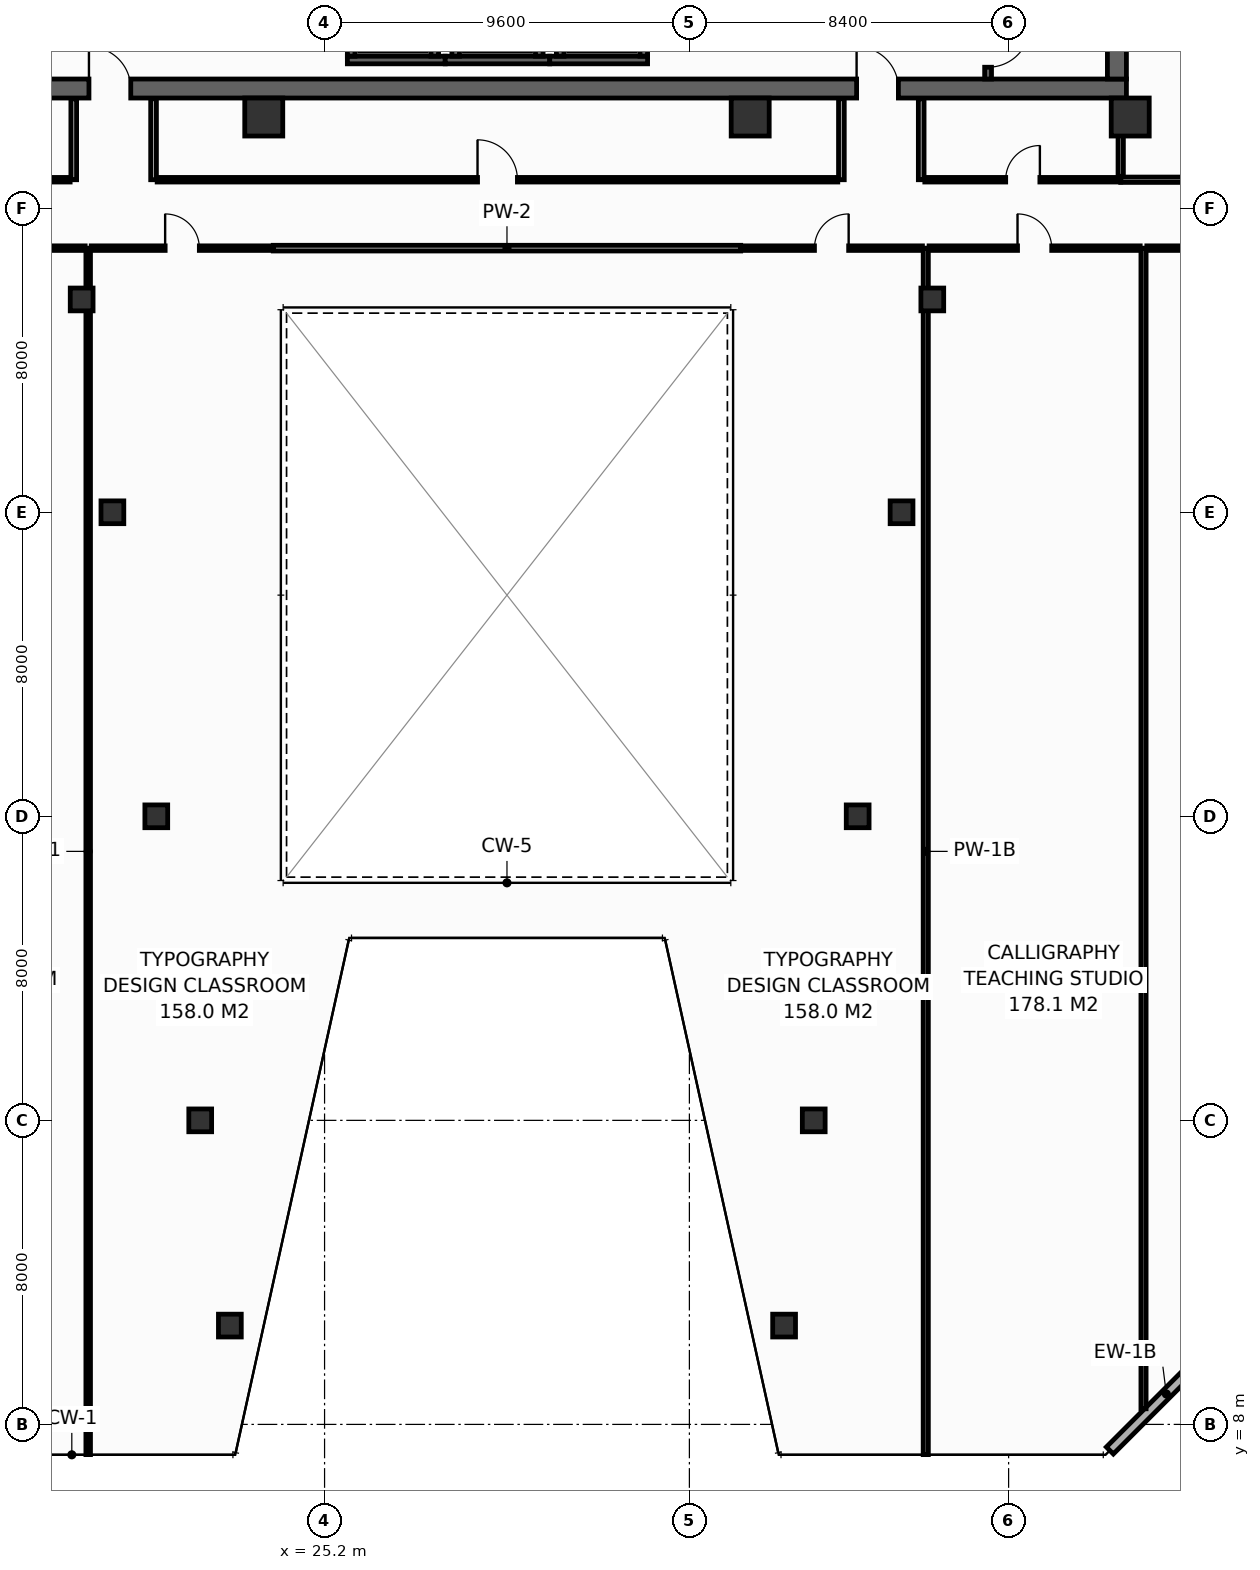
"""IFC4 building model, lengths in metres.
Left out: names, types, materials, properties, quantities, classifications, styles, units other than length and angle.
Written with IfcOpenShell. Run it as: python <this file> out.ifc"""

import sys

from ifc_helpers import new_model, si_unit, direction, frame, frame_2d, origin, origin_2d, place, context, subcontext, project, spatial, rectangle, hollow_rectangle, extrude, element, fill, save


model = new_model("IFC4")
c1 = context("Model", 3, precision=1e-05, world=origin(), true_north=direction((0.0, 1.0)))
c2 = subcontext(c1, "Body", "Model", "MODEL_VIEW")
j1 = project(units=[si_unit("LENGTHUNIT", "METRE"), si_unit("PLANEANGLEUNIT", "RADIAN")], contexts=[c1])
p1 = place(None, origin())
s1 = spatial("IfcSite", under=j1, at=p1, CompositionType="ELEMENT")
p2 = place(p1, origin())
s2 = spatial("IfcBuilding", under=s1, at=p2, CompositionType="ELEMENT")
p3 = place(p2, frame((0.0, 0.0, 137.2)))
s3 = spatial("IfcBuildingStorey", under=s2, at=p3, CompositionType="ELEMENT", Elevation=137.2)
p4 = place(p3, frame((13.6, 43.15, 0.0), z_axis=(0.0, 0.0, 1.0), x_axis=(1.0, 0.0, 0.0)))
e1 = element("IfcWall", 1, at=p4, inside=s3, PredefinedType="SHEAR", context=c2, shape_type="SweptSolid", body=[
    extrude(rectangle(XDim=32.7, YDim=0.5, at=frame_2d((16.35, 0.0))), origin(), (0.0, 0.0, 1.0), 3.55),
])
p5 = place(p4, frame((5.4, 0.0, 0.0)))
e2 = element("IfcOpeningElement", 2, at=p5, cuts=e1, PredefinedType="OPENING", context=c2, shape_type="SweptSolid", body=[
    extrude(rectangle(XDim=1.1, YDim=2.15, at=frame_2d((0.55, 1.075))), frame((0.0, 0.26, 0.0), z_axis=(0.0, -1.0, 0.0), x_axis=(1.0, 0.0, 0.0)), (0.0, 0.0, 1.0), 0.52),
])
p6 = place(p4, frame((25.6, 0.0, 0.0)))
e3 = element("IfcOpeningElement", 3, at=p6, cuts=e1, PredefinedType="OPENING", context=c2, shape_type="SweptSolid", body=[
    extrude(rectangle(XDim=1.1, YDim=2.15, at=frame_2d((0.55, 1.075))), frame((0.0, 0.26, 0.0), z_axis=(0.0, -1.0, 0.0), x_axis=(1.0, 0.0, 0.0)), (0.0, 0.0, 1.0), 0.52),
])
p7 = place(p3, frame((46.05, 43.4, 0.0), z_axis=(0.0, 0.0, 1.0), x_axis=(0.0, 1.0, 0.0)))
e4 = element("IfcWall", 4, at=p7, inside=s3, PredefinedType="SHEAR", context=c2, shape_type="SweptSolid", body=[
    extrude(rectangle(XDim=10.4, YDim=0.5, at=frame_2d((5.2, 0.0))), origin(), (0.0, 0.0, 1.0), 3.55),
])
for number, where, z_axis, x_axis in (
    (5, (23.6, 42.4, 0.0), (0.0, 0.0, 1.0), (1.0, 0.0, 0.0)),
    (6, (36.4, 42.4, 0.0), (0.0, 0.0, 1.0), (1.0, 0.0, 0.0)),
    (7, (46.4, 42.4, 0.0), (0.0, 0.0, 1.0), (1.0, 0.0, 0.0)),
):
    element("IfcColumn", number, at=place(p3, frame(where, z_axis=z_axis, x_axis=x_axis)), inside=s3, PredefinedType="COLUMN", context=c2, shape_type="SweptSolid", body=[
        extrude(hollow_rectangle(XDim=1.0, YDim=1.0, WallThickness=0.045, at=origin_2d()), origin(), (0.0, 0.0, 1.0), 3.8),
    ])
for number, where, z_axis, x_axis in (
    (8, (22.708, 10.6, 0.0), (0.0, 0.0, 1.0), (1.0, 0.0, 0.0)),
    (9, (37.292, 10.6, 0.0), (0.0, 0.0, 1.0), (1.0, 0.0, 0.0)),
    (10, (21.928, 16.0, 0.0), (0.0, 0.0, 1.0), (1.0, 0.0, 0.0)),
    (11, (38.072, 16.0, 0.0), (0.0, 0.0, 1.0), (1.0, 0.0, 0.0)),
    (12, (20.772, 24.0, 0.0), (0.0, 0.0, 1.0), (1.0, 0.0, 0.0)),
    (13, (39.228, 24.0, 0.0), (0.0, 0.0, 1.0), (1.0, 0.0, 0.0)),
    (14, (19.617, 32.0, 0.0), (0.0, 0.0, 1.0), (1.0, 0.0, 0.0)),
    (15, (40.383, 32.0, 0.0), (0.0, 0.0, 1.0), (1.0, 0.0, 0.0)),
    (16, (18.808, 37.6, 0.0), (0.0, 0.0, 1.0), (1.0, 0.0, 0.0)),
    (17, (41.192, 37.6, 0.0), (0.0, 0.0, 1.0), (1.0, 0.0, 0.0)),
):
    element("IfcColumn", number, at=place(p3, frame(where, z_axis=z_axis, x_axis=x_axis)), inside=s3, PredefinedType="COLUMN", context=c2, shape_type="SweptSolid", body=[
        extrude(hollow_rectangle(XDim=0.6, YDim=0.6, WallThickness=0.028, at=origin_2d()), origin(), (0.0, 0.0, 1.0), 3.8),
    ])
p8 = place(p3, frame((25.8, 43.9, 0.0), z_axis=(0.0, 0.0, 1.0), x_axis=(1.0, 0.0, 0.0)))
e18 = element("IfcWall", 18, at=p8, inside=s3, PredefinedType="SHEAR", context=c2, shape_type="SweptSolid", body=[
    extrude(rectangle(XDim=2.575, YDim=0.2, at=frame_2d((1.288, 0.0))), origin(), (0.0, 0.0, 1.0), 3.55),
])
for number, where, z_axis, x_axis in (
    (19, (25.9, 44.0, 0.0), (0.0, 0.0, 1.0), (0.0, 1.0, 0.0)),
    (20, (28.1, 44.0, 0.0), (0.0, 0.0, 1.0), (0.0, 1.0, 0.0)),
):
    element("IfcWall", number, at=place(p3, frame(where, z_axis=z_axis, x_axis=x_axis)), inside=s3, PredefinedType="SHEAR", context=c2, shape_type="SweptSolid", body=[
        extrude(rectangle(XDim=2.3, YDim=0.2, at=frame_2d((1.15, 0.0))), origin(), (0.0, 0.0, 1.0), 3.55),
    ])
p9 = place(p3, frame((28.375, 43.9, 0.0), z_axis=(0.0, 0.0, 1.0), x_axis=(1.0, 0.0, 0.0)))
e21 = element("IfcWall", 21, at=p9, inside=s3, PredefinedType="SHEAR", context=c2, shape_type="SweptSolid", body=[
    extrude(rectangle(XDim=2.75, YDim=0.2, at=frame_2d((1.375, 0.0))), origin(), (0.0, 0.0, 1.0), 3.55),
])
for number, where, z_axis, x_axis in (
    (22, (28.65, 44.0, 0.0), (0.0, 0.0, 1.0), (0.0, 1.0, 0.0)),
    (23, (30.85, 44.0, 0.0), (0.0, 0.0, 1.0), (0.0, 1.0, 0.0)),
):
    element("IfcWall", number, at=place(p3, frame(where, z_axis=z_axis, x_axis=x_axis)), inside=s3, PredefinedType="SHEAR", context=c2, shape_type="SweptSolid", body=[
        extrude(rectangle(XDim=2.3, YDim=0.2, at=frame_2d((1.15, 0.0))), origin(), (0.0, 0.0, 1.0), 3.55),
    ])
p10 = place(p3, frame((31.125, 43.9, 0.0), z_axis=(0.0, 0.0, 1.0), x_axis=(1.0, 0.0, 0.0)))
e24 = element("IfcWall", 24, at=p10, inside=s3, PredefinedType="SHEAR", context=c2, shape_type="SweptSolid", body=[
    extrude(rectangle(XDim=2.575, YDim=0.2, at=frame_2d((1.288, 0.0))), origin(), (0.0, 0.0, 1.0), 3.55),
])
for number, where, z_axis, x_axis in (
    (25, (31.4, 44.0, 0.0), (0.0, 0.0, 1.0), (0.0, 1.0, 0.0)),
    (26, (33.6, 44.0, 0.0), (0.0, 0.0, 1.0), (0.0, 1.0, 0.0)),
):
    element("IfcWall", number, at=place(p3, frame(where, z_axis=z_axis, x_axis=x_axis)), inside=s3, PredefinedType="SHEAR", context=c2, shape_type="SweptSolid", body=[
        extrude(rectangle(XDim=2.3, YDim=0.2, at=frame_2d((1.15, 0.0))), origin(), (0.0, 0.0, 1.0), 3.55),
    ])
p11 = place(p3, frame((42.66, 53.8, 0.0), z_axis=(0.0, 0.0, 1.0), x_axis=(0.0, -1.0, 0.0)))
e27 = element("IfcWall", 27, at=p11, inside=s3, PredefinedType="SHEAR", context=c2, shape_type="SweptSolid", body=[
    extrude(rectangle(XDim=10.4, YDim=0.18, at=frame_2d((5.2, 0.0))), origin(), (0.0, 0.0, 1.0), 3.55),
])
p12 = place(p11, frame((8.99, 0.0, 0.0)))
e28 = element("IfcOpeningElement", 28, at=p12, cuts=e27, PredefinedType="OPENING", context=c2, shape_type="SweptSolid", body=[
    extrude(rectangle(XDim=1.1, YDim=2.15, at=frame_2d((0.55, 1.075))), frame((0.0, 0.1, 0.0), z_axis=(0.0, -1.0, 0.0), x_axis=(1.0, 0.0, 0.0)), (0.0, 0.0, 1.0), 0.2),
])
p13 = place(p3, frame((45.864, 7.313, 0.0), z_axis=(0.0, 0.0, 1.0), x_axis=(0.70707775441, 0.707135806771, 0.0)))
e29 = element("IfcWall", 29, at=p13, inside=s3, PredefinedType="STANDARD", context=c2, shape_type="SweptSolid", body=[
    extrude(rectangle(XDim=4.206, YDim=0.26, at=frame_2d((2.103, 0.0))), origin(), (0.0, 0.0, 1.0), 3.55),
])
p14 = place(p3, frame((46.15, 40.75, 0.0), z_axis=(0.0, 0.0, 1.0), x_axis=(1.0, 0.0, 0.0)))
e30 = element("IfcWall", 30, at=p14, inside=s3, PredefinedType="PARTITIONING", context=c2, shape_type="SweptSolid", body=[
    extrude(rectangle(XDim=4.05, YDim=0.14, at=frame_2d((2.025, 0.0))), origin(), (0.0, 0.0, 1.0), 3.55),
])
p15 = place(p3, frame((46.15, 40.84, 0.0), z_axis=(0.0, 0.0, 1.0), x_axis=(0.0, 1.0, 0.0)))
e31 = element("IfcWall", 31, at=p15, inside=s3, PredefinedType="PARTITIONING", context=c2, shape_type="SweptSolid", body=[
    extrude(rectangle(XDim=2.04, YDim=0.14, at=frame_2d((1.02, 0.0))), origin(), (0.0, 0.0, 1.0), 3.55),
])
for number, where, z_axis, x_axis in (
    (32, (18.6, 40.75, 0.0), (0.0, 0.0, 1.0), (0.0, 1.0, 0.0)),
    (33, (20.7, 40.75, 0.0), (0.0, 0.0, 1.0), (0.0, 1.0, 0.0)),
    (34, (38.8, 40.75, 0.0), (0.0, 0.0, 1.0), (0.0, 1.0, 0.0)),
    (35, (40.9, 40.75, 0.0), (0.0, 0.0, 1.0), (0.0, 1.0, 0.0)),
):
    element("IfcWall", number, at=place(p3, frame(where, z_axis=z_axis, x_axis=x_axis)), inside=s3, PredefinedType="PARTITIONING", context=c2, shape_type="SweptSolid", body=[
        extrude(rectangle(XDim=2.13, YDim=0.15, at=frame_2d((1.065, 0.0))), origin(), (0.0, 0.0, 1.0), 3.55),
    ])
p16 = place(p3, frame((13.85, 40.75, 0.0), z_axis=(0.0, 0.0, 1.0), x_axis=(1.0, 0.0, 0.0)))
e36 = element("IfcWall", 36, at=p16, inside=s3, PredefinedType="PARTITIONING", context=c2, shape_type="SweptSolid", body=[
    extrude(rectangle(XDim=4.655, YDim=0.12, at=frame_2d((2.327, 0.0))), origin(), (0.0, 0.0, 1.0), 3.55),
])
p17 = place(p16, frame((1.802, 0.0, 0.0)))
e37 = element("IfcOpeningElement", 37, at=p17, cuts=e36, PredefinedType="OPENING", context=c2, shape_type="SweptSolid", body=[
    extrude(rectangle(XDim=1.05, YDim=2.15, at=frame_2d((0.525, 1.075))), frame((0.0, 0.07, 0.0), z_axis=(0.0, -1.0, 0.0), x_axis=(1.0, 0.0, 0.0)), (0.0, 0.0, 1.0), 0.14),
])
p18 = place(p3, frame((20.795, 40.75, 0.0), z_axis=(0.0, 0.0, 1.0), x_axis=(1.0, 0.0, 0.0)))
e38 = element("IfcWall", 38, at=p18, inside=s3, PredefinedType="PARTITIONING", context=c2, shape_type="SweptSolid", body=[
    extrude(rectangle(XDim=17.91, YDim=0.12, at=frame_2d((8.955, 0.0))), origin(), (0.0, 0.0, 1.0), 2.835),
])
p19 = place(p18, frame((8.43, 0.0, 0.0)))
e39 = element("IfcOpeningElement", 39, at=p19, cuts=e38, PredefinedType="OPENING", context=c2, shape_type="SweptSolid", body=[
    extrude(rectangle(XDim=1.05, YDim=2.15, at=frame_2d((0.525, 1.075))), frame((0.0, 0.07, 0.0), z_axis=(0.0, -1.0, 0.0), x_axis=(1.0, 0.0, 0.0)), (0.0, 0.0, 1.0), 0.14),
])
p20 = place(p3, frame((40.995, 40.75, 0.0), z_axis=(0.0, 0.0, 1.0), x_axis=(1.0, 0.0, 0.0)))
e40 = element("IfcWall", 40, at=p20, inside=s3, PredefinedType="PARTITIONING", context=c2, shape_type="SweptSolid", body=[
    extrude(rectangle(XDim=5.155, YDim=0.12, at=frame_2d((2.577, 0.0))), origin(), (0.0, 0.0, 1.0), 3.55),
])
p21 = place(p20, frame((2.128, 0.0, 0.0)))
e41 = element("IfcOpeningElement", 41, at=p21, cuts=e40, PredefinedType="OPENING", context=c2, shape_type="SweptSolid", body=[
    extrude(rectangle(XDim=0.9, YDim=2.1, at=frame_2d((0.45, 1.05))), frame((0.0, 0.07, 0.0), z_axis=(0.0, -1.0, 0.0), x_axis=(1.0, 0.0, 0.0)), (0.0, 0.0, 1.0), 0.14),
])
p22 = place(p3, frame((18.98, 7.205, 0.0), z_axis=(0.0, 0.0, 1.0), x_axis=(0.0, 1.0, 0.0)))
e42 = element("IfcWall", 42, at=p22, inside=s3, PredefinedType="PARTITIONING", context=c2, shape_type="SweptSolid", body=[
    extrude(rectangle(XDim=31.745, YDim=0.12, at=frame_2d((15.873, 0.0))), origin(), (0.0, 0.0, 1.0), 2.835),
])
p23 = place(p3, frame((41.02, 7.205, 0.0), z_axis=(0.0, 0.0, 1.0), x_axis=(0.0, 1.0, 0.0)))
e43 = element("IfcWall", 43, at=p23, inside=s3, PredefinedType="PARTITIONING", context=c2, shape_type="SweptSolid", body=[
    extrude(rectangle(XDim=31.745, YDim=0.135, at=frame_2d((15.873, 0.0))), origin(), (0.0, 0.0, 1.0), 2.835),
])
p24 = place(p3, frame((46.75, 8.411, 0.0), z_axis=(0.0, 0.0, 1.0), x_axis=(0.0, 1.0, 0.0)))
e44 = element("IfcWall", 44, at=p24, inside=s3, PredefinedType="PARTITIONING", context=c2, shape_type="SweptSolid", body=[
    extrude(rectangle(XDim=30.539, YDim=0.135, at=frame_2d((15.27, 0.0))), origin(), (0.0, 0.0, 1.0), 2.835),
])
p25 = place(p3, frame((13.33, 38.95, 0.0), z_axis=(0.0, 0.0, 1.0), x_axis=(1.0, 0.0, 0.0)))
e45 = element("IfcWall", 45, at=p25, inside=s3, PredefinedType="PARTITIONING", context=c2, shape_type="SweptSolid", body=[
    extrude(rectangle(XDim=5.57, YDim=0.12, at=frame_2d((2.785, 0.0))), origin(), (0.0, 0.0, 1.0), 3.55),
])
p26 = place(p25, frame((2.26, 0.0, 0.0)))
e46 = element("IfcOpeningElement", 46, at=p26, cuts=e45, PredefinedType="OPENING", context=c2, shape_type="SweptSolid", body=[
    extrude(rectangle(XDim=1.05, YDim=2.15, at=frame_2d((0.525, 1.075))), frame((0.0, 0.07, 0.0), z_axis=(0.0, -1.0, 0.0), x_axis=(1.0, 0.0, 0.0)), (0.0, 0.0, 1.0), 0.14),
])
p27 = place(p3, frame((19.06, 38.95, 0.0), z_axis=(0.0, 0.0, 1.0), x_axis=(1.0, 0.0, 0.0)))
e47 = element("IfcWall", 47, at=p27, inside=s3, PredefinedType="PARTITIONING", context=c2, shape_type="SweptSolid", body=[
    extrude(rectangle(XDim=4.79, YDim=0.12, at=frame_2d((2.395, 0.0))), origin(), (0.0, 0.0, 1.0), 2.835),
])
p28 = place(p27, frame((1.945, 0.0, 0.0)))
e48 = element("IfcOpeningElement", 48, at=p28, cuts=e47, PredefinedType="OPENING", context=c2, shape_type="SweptSolid", body=[
    extrude(rectangle(XDim=0.9, YDim=2.1, at=frame_2d((0.45, 1.05))), frame((0.0, 0.07, 0.0), z_axis=(0.0, -1.0, 0.0), x_axis=(1.0, 0.0, 0.0)), (0.0, 0.0, 1.0), 0.14),
])
p29 = place(p3, frame((23.85, 38.95, 0.0), z_axis=(0.0, 0.0, 1.0), x_axis=(1.0, 0.0, 0.0)))
e49 = element("IfcWall", 49, at=p29, inside=s3, PredefinedType="PARTITIONING", context=c2, shape_type="SweptSolid", body=[
    extrude(rectangle(XDim=12.3, YDim=0.15, at=frame_2d((6.15, 0.0))), origin(), (0.0, 0.0, 1.0), 3.55),
])
p30 = place(p3, frame((36.15, 38.95, 0.0), z_axis=(0.0, 0.0, 1.0), x_axis=(1.0, 0.0, 0.0)))
e50 = element("IfcWall", 50, at=p30, inside=s3, PredefinedType="PARTITIONING", context=c2, shape_type="SweptSolid", body=[
    extrude(rectangle(XDim=4.783, YDim=0.12, at=frame_2d((2.391, 0.0))), origin(), (0.0, 0.0, 1.0), 2.835),
])
p31 = place(p30, frame((1.941, 0.0, 0.0)))
e51 = element("IfcOpeningElement", 51, at=p31, cuts=e50, PredefinedType="OPENING", context=c2, shape_type="SweptSolid", body=[
    extrude(rectangle(XDim=0.9, YDim=2.1, at=frame_2d((0.45, 1.05))), frame((0.0, 0.07, 0.0), z_axis=(0.0, -1.0, 0.0), x_axis=(1.0, 0.0, 0.0)), (0.0, 0.0, 1.0), 0.14),
])
p32 = place(p3, frame((41.107, 38.95, 0.0), z_axis=(0.0, 0.0, 1.0), x_axis=(1.0, 0.0, 0.0)))
e52 = element("IfcWall", 52, at=p32, inside=s3, PredefinedType="PARTITIONING", context=c2, shape_type="SweptSolid", body=[
    extrude(rectangle(XDim=5.555, YDim=0.12, at=frame_2d((2.778, 0.0))), origin(), (0.0, 0.0, 1.0), 3.55),
])
p33 = place(p32, frame((2.327, 0.0, 0.0)))
e53 = element("IfcOpeningElement", 53, at=p33, cuts=e52, PredefinedType="OPENING", context=c2, shape_type="SweptSolid", body=[
    extrude(rectangle(XDim=0.9, YDim=2.1, at=frame_2d((0.45, 1.05))), frame((0.0, 0.07, 0.0), z_axis=(0.0, -1.0, 0.0), x_axis=(1.0, 0.0, 0.0)), (0.0, 0.0, 1.0), 0.14),
])
p34 = place(p3, frame((46.837, 38.95, 0.0), z_axis=(0.0, 0.0, 1.0), x_axis=(1.0, 0.0, 0.0)))
e54 = element("IfcWall", 54, at=p34, inside=s3, PredefinedType="PARTITIONING", context=c2, shape_type="SweptSolid", body=[
    extrude(rectangle(XDim=6.8, YDim=0.12, at=frame_2d((3.4, 0.0))), origin(), (0.0, 0.0, 1.0), 3.035),
])
p35 = place(p34, frame((2.95, 0.0, 0.0)))
e55 = element("IfcOpeningElement", 55, at=p35, cuts=e54, PredefinedType="OPENING", context=c2, shape_type="SweptSolid", body=[
    extrude(rectangle(XDim=0.9, YDim=2.1, at=frame_2d((0.45, 1.05))), frame((0.0, 0.07, 0.0), z_axis=(0.0, -1.0, 0.0), x_axis=(1.0, 0.0, 0.0)), (0.0, 0.0, 1.0), 0.14),
])
p36 = place(p12, origin())
e56 = element("IfcDoor", 56, at=p36, inside=s3, OperationType="SINGLE_SWING_LEFT", PredefinedType="DOOR", context=c2, shape_type="SweptSolid", body=[
    extrude(rectangle(XDim=1.1, YDim=2.15, at=frame_2d((0.55, 1.075))), frame((0.0, 0.025, 0.0), z_axis=(0.0, -1.0, 0.0), x_axis=(1.0, 0.0, 0.0)), (0.0, 0.0, 1.0), 0.05),
])
fill(e28, e56)
p37 = place(p5, origin())
e57 = element("IfcDoor", 57, at=p37, inside=s3, OperationType="SINGLE_SWING_LEFT", PredefinedType="DOOR", context=c2, shape_type="SweptSolid", body=[
    extrude(rectangle(XDim=1.1, YDim=2.15, at=frame_2d((0.55, 1.075))), frame((0.0, 0.025, 0.0), z_axis=(0.0, -1.0, 0.0), x_axis=(1.0, 0.0, 0.0)), (0.0, 0.0, 1.0), 0.05),
])
fill(e2, e57)
p38 = place(p6, origin())
e58 = element("IfcDoor", 58, at=p38, inside=s3, OperationType="SINGLE_SWING_LEFT", PredefinedType="DOOR", context=c2, shape_type="SweptSolid", body=[
    extrude(rectangle(XDim=1.1, YDim=2.15, at=frame_2d((0.55, 1.075))), frame((0.0, 0.025, 0.0), z_axis=(0.0, -1.0, 0.0), x_axis=(1.0, 0.0, 0.0)), (0.0, 0.0, 1.0), 0.05),
])
fill(e3, e58)
p39 = place(p19, origin())
e59 = element("IfcDoor", 59, at=p39, inside=s3, OperationType="SINGLE_SWING_LEFT", PredefinedType="DOOR", context=c2, shape_type="SweptSolid", body=[
    extrude(rectangle(XDim=1.05, YDim=2.15, at=frame_2d((0.525, 1.075))), frame((0.0, 0.025, 0.0), z_axis=(0.0, -1.0, 0.0), x_axis=(1.0, 0.0, 0.0)), (0.0, 0.0, 1.0), 0.05),
])
fill(e39, e59)
p40 = place(p21, origin())
e60 = element("IfcDoor", 60, at=p40, inside=s3, OperationType="SINGLE_SWING_RIGHT", PredefinedType="DOOR", context=c2, shape_type="SweptSolid", body=[
    extrude(rectangle(XDim=0.9, YDim=2.1, at=frame_2d((0.45, 1.05))), frame((0.0, 0.025, 0.0), z_axis=(0.0, -1.0, 0.0), x_axis=(1.0, 0.0, 0.0)), (0.0, 0.0, 1.0), 0.05),
])
fill(e41, e60)
p41 = place(p28, origin())
e61 = element("IfcDoor", 61, at=p41, inside=s3, OperationType="SINGLE_SWING_LEFT", PredefinedType="DOOR", context=c2, shape_type="SweptSolid", body=[
    extrude(rectangle(XDim=0.9, YDim=2.1, at=frame_2d((0.45, 1.05))), frame((0.0, 0.025, 0.0), z_axis=(0.0, -1.0, 0.0), x_axis=(1.0, 0.0, 0.0)), (0.0, 0.0, 1.0), 0.05),
])
fill(e48, e61)
p42 = place(p31, origin())
e62 = element("IfcDoor", 62, at=p42, inside=s3, OperationType="SINGLE_SWING_RIGHT", PredefinedType="DOOR", context=c2, shape_type="SweptSolid", body=[
    extrude(rectangle(XDim=0.9, YDim=2.1, at=frame_2d((0.45, 1.05))), frame((0.0, 0.025, 0.0), z_axis=(0.0, -1.0, 0.0), x_axis=(1.0, 0.0, 0.0)), (0.0, 0.0, 1.0), 0.05),
])
fill(e51, e62)
p43 = place(p33, origin())
e63 = element("IfcDoor", 63, at=p43, inside=s3, OperationType="SINGLE_SWING_LEFT", PredefinedType="DOOR", context=c2, shape_type="SweptSolid", body=[
    extrude(rectangle(XDim=0.9, YDim=2.1, at=frame_2d((0.45, 1.05))), frame((0.0, 0.025, 0.0), z_axis=(0.0, -1.0, 0.0), x_axis=(1.0, 0.0, 0.0)), (0.0, 0.0, 1.0), 0.05),
])
fill(e53, e63)
save(model, sys.argv[1])
